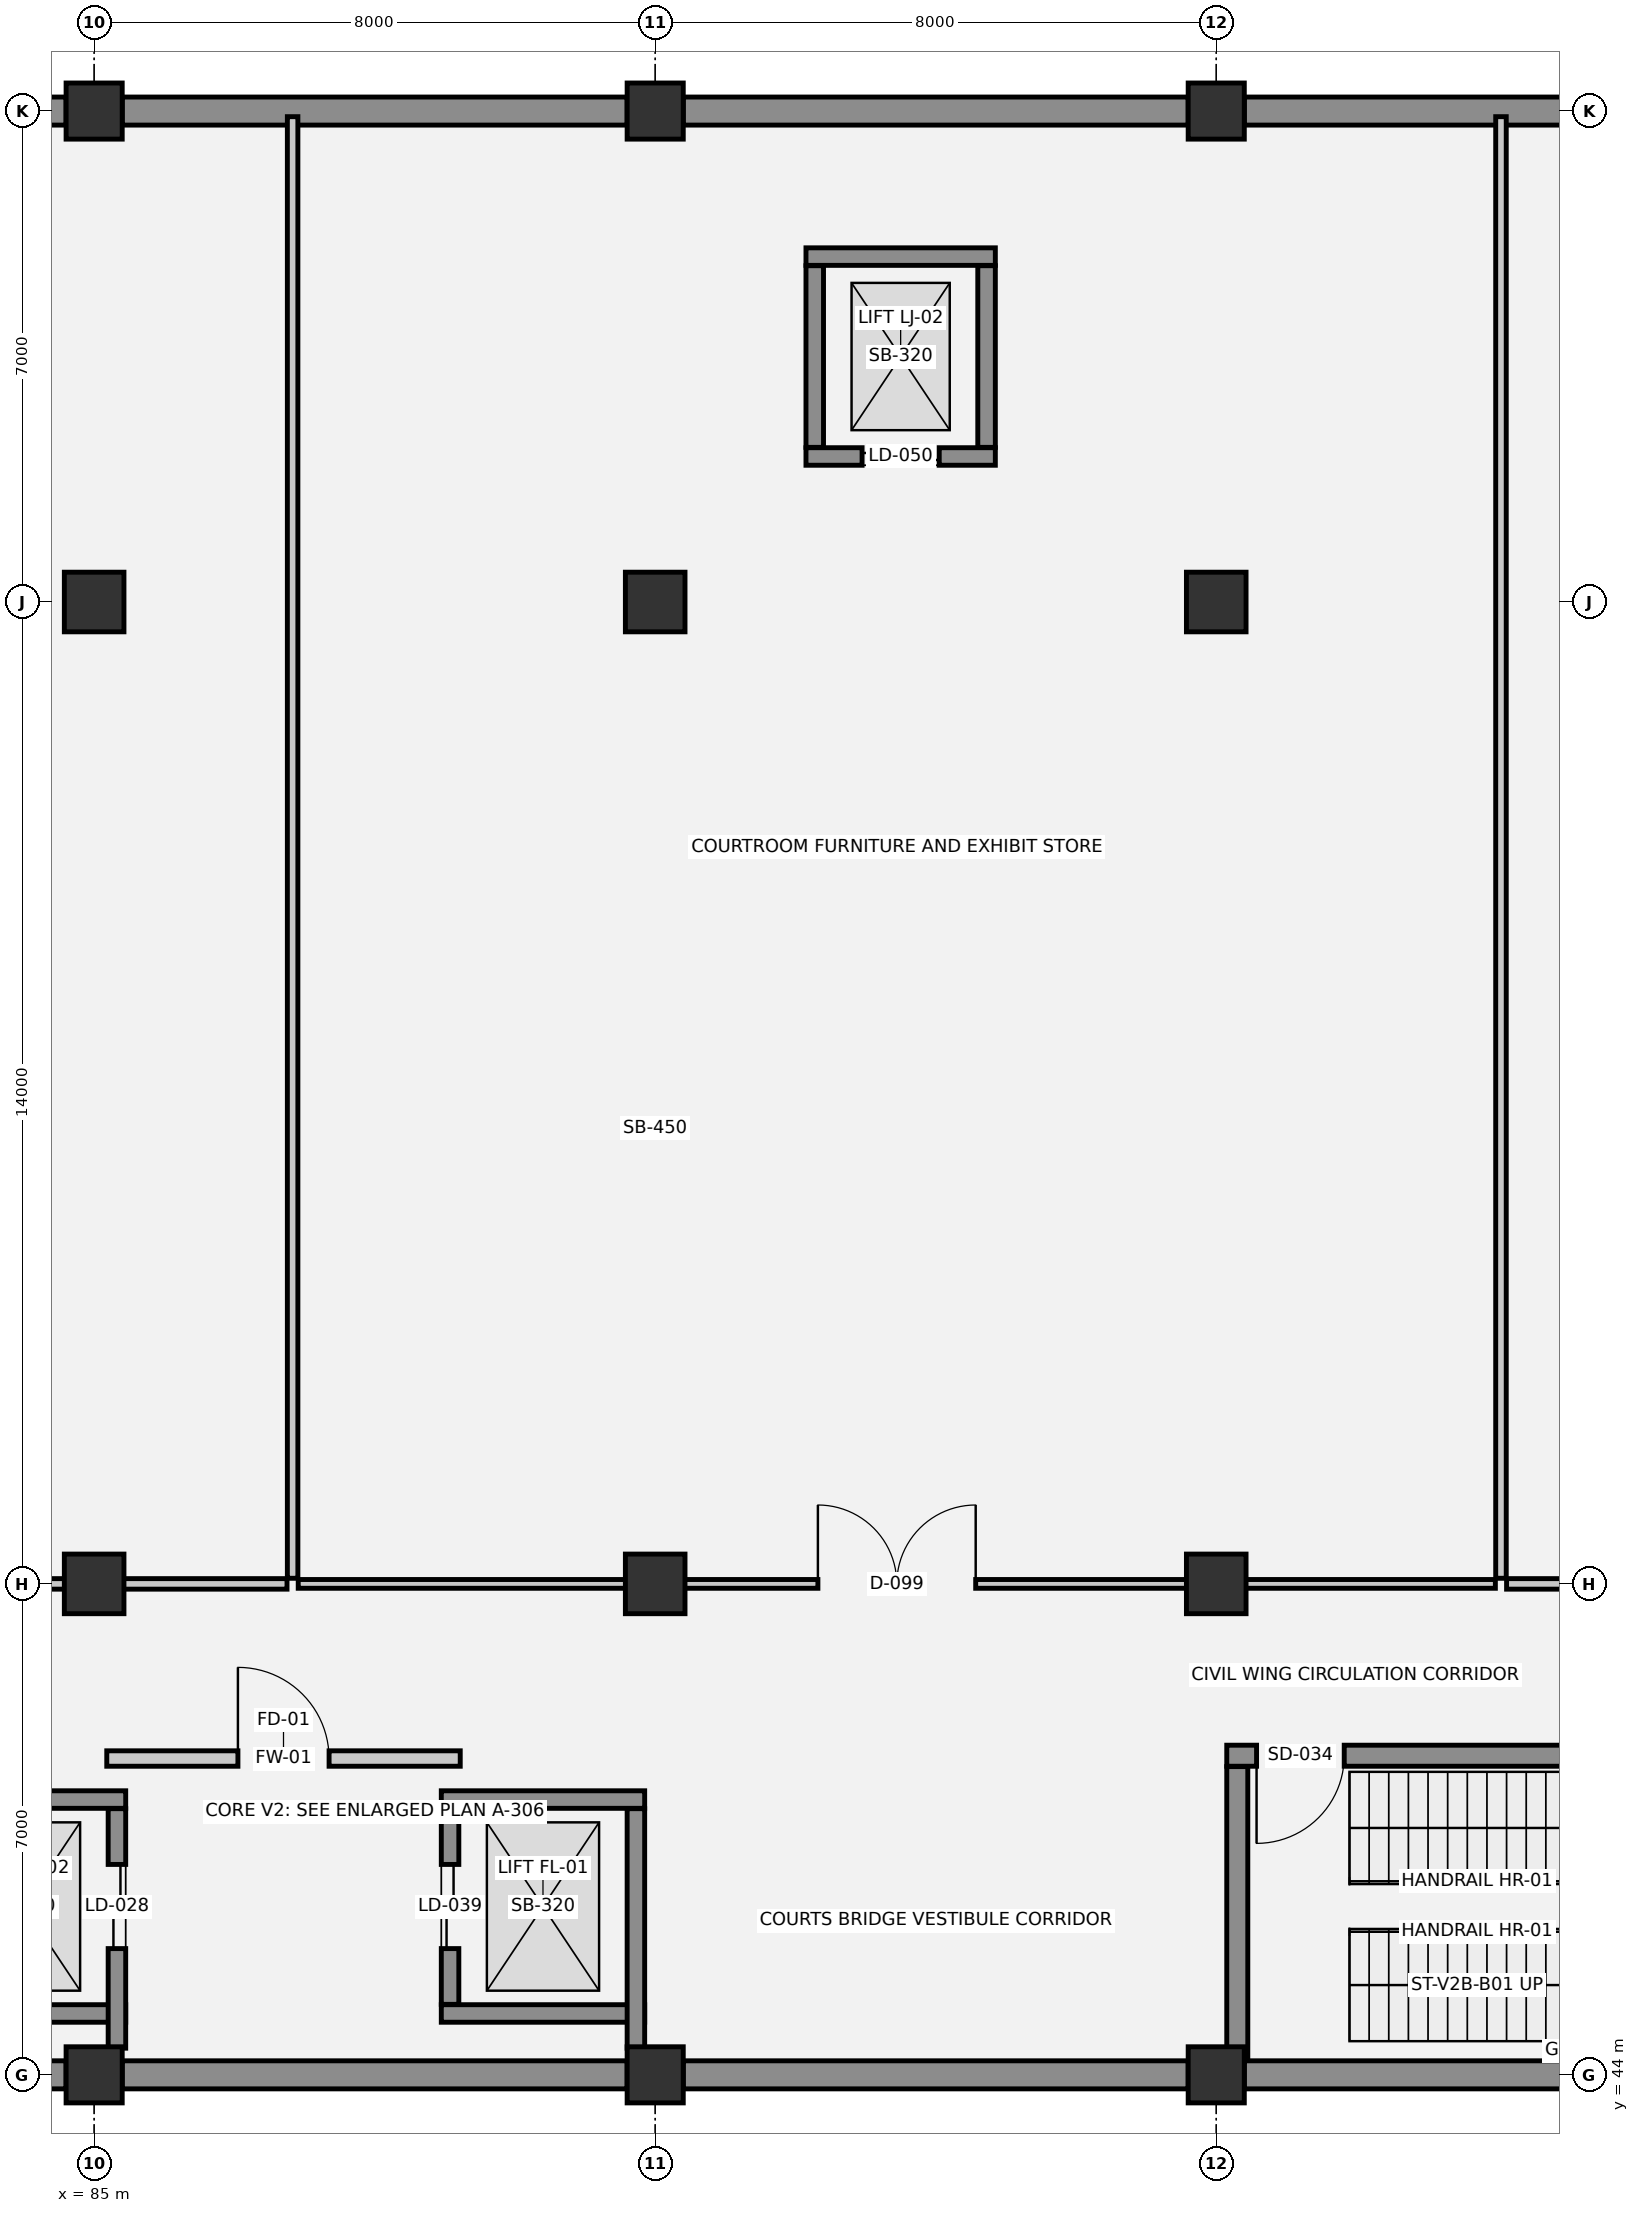
"""IFC4 building model, lengths in metres.
Left out: names, types, materials, properties, quantities, classifications, styles, units other than length and angle.
Written with IfcOpenShell. Run it as: python <this file> out.ifc"""

import sys

from ifc_helpers import new_model, si_unit, direction, frame, frame_2d, origin, origin_2d, place, context, subcontext, project, spatial, rectangle, extrude, element, fill, save


model = new_model("IFC4")
c1 = context("Model", 3, precision=1e-05, world=origin(), true_north=direction((0.0, 1.0)))
c2 = subcontext(c1, "Body", "Model", "MODEL_VIEW")
j1 = project(units=[si_unit("LENGTHUNIT", "METRE"), si_unit("PLANEANGLEUNIT", "RADIAN")], contexts=[c1])
p1 = place(None, origin())
s1 = spatial("IfcSite", under=j1, at=p1, CompositionType="ELEMENT")
p2 = place(p1, origin())
s2 = spatial("IfcBuilding", under=s1, at=p2, CompositionType="ELEMENT")
p3 = place(p2, frame((0.0, 0.0, -4.5)))
s3 = spatial("IfcBuildingStorey", under=s2, at=p3, CompositionType="ELEMENT", Elevation=-4.5)
p4 = place(p3, frame((85.0, 44.0, 0.0), z_axis=(0.0, 0.0, 1.0), x_axis=(1.0, 0.0, 0.0)))
e1 = element("IfcColumn", 1, at=p4, inside=s3, PredefinedType="COLUMN", context=c2, shape_type="SweptSolid", body=[
    extrude(rectangle(XDim=0.8, YDim=0.8, at=origin_2d()), origin(), (0.0, 0.0, 1.0), 4.5),
])
for number, where, z_axis, x_axis in (
    (2, (85.0, 51.0, 0.0), (0.0, 0.0, 1.0), (1.0, 0.0, 0.0)),
    (3, (85.0, 65.0, 0.0), (0.0, 0.0, 1.0), (1.0, 0.0, 0.0)),
):
    element("IfcColumn", number, at=place(p3, frame(where, z_axis=z_axis, x_axis=x_axis)), inside=s3, PredefinedType="COLUMN", context=c2, shape_type="SweptSolid", body=[
        extrude(rectangle(XDim=0.85, YDim=0.85, at=origin_2d()), origin(), (0.0, 0.0, 1.0), 4.5),
    ])
for number, where, z_axis, x_axis in (
    (4, (85.0, 72.0, 0.0), (0.0, 0.0, 1.0), (1.0, 0.0, 0.0)),
    (5, (93.0, 44.0, 0.0), (0.0, 0.0, 1.0), (1.0, 0.0, 0.0)),
):
    element("IfcColumn", number, at=place(p3, frame(where, z_axis=z_axis, x_axis=x_axis)), inside=s3, PredefinedType="COLUMN", context=c2, shape_type="SweptSolid", body=[
        extrude(rectangle(XDim=0.8, YDim=0.8, at=origin_2d()), origin(), (0.0, 0.0, 1.0), 4.5),
    ])
for number, where, z_axis, x_axis in (
    (6, (93.0, 51.0, 0.0), (0.0, 0.0, 1.0), (1.0, 0.0, 0.0)),
    (7, (93.0, 65.0, 0.0), (0.0, 0.0, 1.0), (1.0, 0.0, 0.0)),
):
    element("IfcColumn", number, at=place(p3, frame(where, z_axis=z_axis, x_axis=x_axis)), inside=s3, PredefinedType="COLUMN", context=c2, shape_type="SweptSolid", body=[
        extrude(rectangle(XDim=0.85, YDim=0.85, at=origin_2d()), origin(), (0.0, 0.0, 1.0), 4.5),
    ])
for number, where, z_axis, x_axis in (
    (8, (93.0, 72.0, 0.0), (0.0, 0.0, 1.0), (1.0, 0.0, 0.0)),
    (9, (101.0, 44.0, 0.0), (0.0, 0.0, 1.0), (1.0, 0.0, 0.0)),
):
    element("IfcColumn", number, at=place(p3, frame(where, z_axis=z_axis, x_axis=x_axis)), inside=s3, PredefinedType="COLUMN", context=c2, shape_type="SweptSolid", body=[
        extrude(rectangle(XDim=0.8, YDim=0.8, at=origin_2d()), origin(), (0.0, 0.0, 1.0), 4.5),
    ])
for number, where, z_axis, x_axis in (
    (10, (101.0, 51.0, 0.0), (0.0, 0.0, 1.0), (1.0, 0.0, 0.0)),
    (11, (101.0, 65.0, 0.0), (0.0, 0.0, 1.0), (1.0, 0.0, 0.0)),
):
    element("IfcColumn", number, at=place(p3, frame(where, z_axis=z_axis, x_axis=x_axis)), inside=s3, PredefinedType="COLUMN", context=c2, shape_type="SweptSolid", body=[
        extrude(rectangle(XDim=0.85, YDim=0.85, at=origin_2d()), origin(), (0.0, 0.0, 1.0), 4.5),
    ])
p5 = place(p3, frame((101.0, 72.0, 0.0), z_axis=(0.0, 0.0, 1.0), x_axis=(1.0, 0.0, 0.0)))
e12 = element("IfcColumn", 12, at=p5, inside=s3, PredefinedType="COLUMN", context=c2, shape_type="SweptSolid", body=[
    extrude(rectangle(XDim=0.8, YDim=0.8, at=origin_2d()), origin(), (0.0, 0.0, 1.0), 4.5),
])
for number, where, z_axis, x_axis in (
    (13, (77.4, 72.0, 0.0), (0.0, 0.0, 1.0), (1.0, 0.0, 0.0)),
    (14, (85.4, 72.0, 0.0), (0.0, 0.0, 1.0), (1.0, 0.0, 0.0)),
    (15, (93.4, 72.0, 0.0), (0.0, 0.0, 1.0), (1.0, 0.0, 0.0)),
    (16, (101.4, 72.0, 0.0), (0.0, 0.0, 1.0), (1.0, 0.0, 0.0)),
    (17, (108.6, 44.0, 0.0), (0.0, 0.0, 1.0), (-1.0, 0.0, 0.0)),
    (18, (100.6, 44.0, 0.0), (0.0, 0.0, 1.0), (-1.0, 0.0, 0.0)),
    (19, (92.6, 44.0, 0.0), (0.0, 0.0, 1.0), (-1.0, 0.0, 0.0)),
    (20, (84.6, 44.0, 0.0), (0.0, 0.0, 1.0), (-1.0, 0.0, 0.0)),
):
    element("IfcWall", number, at=place(p3, frame(where, z_axis=z_axis, x_axis=x_axis)), inside=s3, PredefinedType="STANDARD", context=c2, shape_type="SweptSolid", body=[
        extrude(rectangle(XDim=7.2, YDim=0.4, at=frame_2d((3.6, 0.0))), origin(), (0.0, 0.0, 1.0), 4.2),
    ])
for number, where, z_axis, x_axis in (
    (21, (82.55, 44.875, 0.0), (0.0, 0.0, 1.0), (1.0, 0.0, 0.0)),
    (22, (85.45, 47.925, 0.0), (0.0, 0.0, 1.0), (-1.0, 0.0, 0.0)),
):
    element("IfcWall", number, at=place(p3, frame(where, z_axis=z_axis, x_axis=x_axis)), inside=s3, PredefinedType="SHEAR", context=c2, shape_type="SweptSolid", body=[
        extrude(rectangle(XDim=2.9, YDim=0.25, at=frame_2d((1.45, 0.0))), origin(), (0.0, 0.0, 1.0), 4.5),
    ])
p6 = place(p3, frame((85.325, 44.38, 0.0), z_axis=(0.0, 0.0, 1.0), x_axis=(0.0, 1.0, 0.0)))
e23 = element("IfcWall", 23, at=p6, inside=s3, PredefinedType="SHEAR", context=c2, shape_type="SweptSolid", body=[
    extrude(rectangle(XDim=3.415, YDim=0.25, at=frame_2d((1.708, 0.0))), origin(), (0.0, 0.0, 1.0), 4.5),
])
p7 = place(p6, frame((1.42, 0.0, 0.0)))
e24 = element("IfcOpeningElement", 24, at=p7, cuts=e23, PredefinedType="OPENING", context=c2, shape_type="SweptSolid", body=[
    extrude(rectangle(XDim=1.2, YDim=2.2, at=frame_2d((0.6, 1.1))), frame((0.0, 0.135, 0.0), z_axis=(0.0, -1.0, 0.0), x_axis=(1.0, 0.0, 0.0)), (0.0, 0.0, 1.0), 0.27),
])
for number, where, z_axis, x_axis in (
    (25, (89.95, 44.875, 0.0), (0.0, 0.0, 1.0), (1.0, 0.0, 0.0)),
    (26, (92.85, 47.925, 0.0), (0.0, 0.0, 1.0), (-1.0, 0.0, 0.0)),
):
    element("IfcWall", number, at=place(p3, frame(where, z_axis=z_axis, x_axis=x_axis)), inside=s3, PredefinedType="SHEAR", context=c2, shape_type="SweptSolid", body=[
        extrude(rectangle(XDim=2.9, YDim=0.25, at=frame_2d((1.45, 0.0))), origin(), (0.0, 0.0, 1.0), 4.5),
    ])
p8 = place(p3, frame((90.075, 47.795, 0.0), z_axis=(0.0, 0.0, 1.0), x_axis=(0.0, -1.0, 0.0)))
e27 = element("IfcWall", 27, at=p8, inside=s3, PredefinedType="SHEAR", context=c2, shape_type="SweptSolid", body=[
    extrude(rectangle(XDim=2.79, YDim=0.25, at=frame_2d((1.395, 0.0))), origin(), (0.0, 0.0, 1.0), 4.5),
])
p9 = place(p8, frame((0.795, 0.0, 0.0)))
e28 = element("IfcOpeningElement", 28, at=p9, cuts=e27, PredefinedType="OPENING", context=c2, shape_type="SweptSolid", body=[
    extrude(rectangle(XDim=1.2, YDim=2.2, at=frame_2d((0.6, 1.1))), frame((0.0, 0.135, 0.0), z_axis=(0.0, -1.0, 0.0), x_axis=(1.0, 0.0, 0.0)), (0.0, 0.0, 1.0), 0.27),
])
p10 = place(p3, frame((92.725, 44.38, 0.0), z_axis=(0.0, 0.0, 1.0), x_axis=(0.0, 1.0, 0.0)))
e29 = element("IfcWall", 29, at=p10, inside=s3, PredefinedType="SHEAR", context=c2, shape_type="SweptSolid", body=[
    extrude(rectangle(XDim=3.415, YDim=0.25, at=frame_2d((1.708, 0.0))), origin(), (0.0, 0.0, 1.0), 4.5),
])
p11 = place(p3, frame((95.15, 67.075, 0.0), z_axis=(0.0, 0.0, 1.0), x_axis=(1.0, 0.0, 0.0)))
e30 = element("IfcWall", 30, at=p11, inside=s3, PredefinedType="SHEAR", context=c2, shape_type="SweptSolid", body=[
    extrude(rectangle(XDim=2.7, YDim=0.25, at=frame_2d((1.35, 0.0))), origin(), (0.0, 0.0, 1.0), 4.5),
])
p12 = place(p11, frame((0.8, 0.0, 0.0)))
e31 = element("IfcOpeningElement", 31, at=p12, cuts=e30, PredefinedType="OPENING", context=c2, shape_type="SweptSolid", body=[
    extrude(rectangle(XDim=1.1, YDim=2.15, at=frame_2d((0.55, 1.075))), frame((0.0, 0.135, 0.0), z_axis=(0.0, -1.0, 0.0), x_axis=(1.0, 0.0, 0.0)), (0.0, 0.0, 1.0), 0.27),
])
p13 = place(p3, frame((97.85, 69.925, 0.0), z_axis=(0.0, 0.0, 1.0), x_axis=(-1.0, 0.0, 0.0)))
e32 = element("IfcWall", 32, at=p13, inside=s3, PredefinedType="SHEAR", context=c2, shape_type="SweptSolid", body=[
    extrude(rectangle(XDim=2.7, YDim=0.25, at=frame_2d((1.35, 0.0))), origin(), (0.0, 0.0, 1.0), 4.5),
])
for number, where, z_axis, x_axis in (
    (33, (95.275, 69.795, 0.0), (0.0, 0.0, 1.0), (0.0, -1.0, 0.0)),
    (34, (97.725, 67.205, 0.0), (0.0, 0.0, 1.0), (0.0, 1.0, 0.0)),
):
    element("IfcWall", number, at=place(p3, frame(where, z_axis=z_axis, x_axis=x_axis)), inside=s3, PredefinedType="SHEAR", context=c2, shape_type="SweptSolid", body=[
        extrude(rectangle(XDim=2.59, YDim=0.25, at=frame_2d((1.295, 0.0))), origin(), (0.0, 0.0, 1.0), 4.5),
    ])
p14 = place(p3, frame((108.85, 48.55, 0.0), z_axis=(0.0, 0.0, 1.0), x_axis=(-1.0, 0.0, 0.0)))
e35 = element("IfcWall", 35, at=p14, inside=s3, PredefinedType="SHEAR", context=c2, shape_type="SweptSolid", body=[
    extrude(rectangle(XDim=7.7, YDim=0.3, at=frame_2d((3.85, 0.0))), origin(), (0.0, 0.0, 1.0), 4.2),
])
p15 = place(p14, frame((6.025, 0.0, 0.0)))
e36 = element("IfcOpeningElement", 36, at=p15, cuts=e35, PredefinedType="OPENING", context=c2, shape_type="SweptSolid", body=[
    extrude(rectangle(XDim=1.25, YDim=2.15, at=frame_2d((0.625, 1.075))), frame((0.0, 0.16, 0.0), z_axis=(0.0, -1.0, 0.0), x_axis=(1.0, 0.0, 0.0)), (0.0, 0.0, 1.0), 0.32),
])
p16 = place(p3, frame((101.3, 48.395, 0.0), z_axis=(0.0, 0.0, 1.0), x_axis=(0.0, -1.0, 0.0)))
e37 = element("IfcWall", 37, at=p16, inside=s3, PredefinedType="SHEAR", context=c2, shape_type="SweptSolid", body=[
    extrude(rectangle(XDim=4.19, YDim=0.3, at=frame_2d((2.095, 0.0))), origin(), (0.0, 0.0, 1.0), 4.2),
])
p17 = place(p3, frame((85.18, 48.51, 0.0), z_axis=(0.0, 0.0, 1.0), x_axis=(1.0, 0.0, 0.0)))
e38 = element("IfcWall", 38, at=p17, inside=s3, PredefinedType="SOLIDWALL", context=c2, shape_type="SweptSolid", body=[
    extrude(rectangle(XDim=5.04, YDim=0.22, at=frame_2d((2.52, 0.0))), origin(), (0.0, 0.0, 1.0), 4.2),
])
p18 = place(p17, frame((1.87, 0.0, 0.0)))
e39 = element("IfcOpeningElement", 39, at=p18, cuts=e38, PredefinedType="OPENING", context=c2, shape_type="SweptSolid", body=[
    extrude(rectangle(XDim=1.3, YDim=2.15, at=frame_2d((0.65, 1.075))), frame((0.0, 0.12, 0.0), z_axis=(0.0, -1.0, 0.0), x_axis=(1.0, 0.0, 0.0)), (0.0, 0.0, 1.0), 0.24),
])
p19 = place(p3, frame((82.4, 51.0, 0.0), z_axis=(0.0, 0.0, 1.0), x_axis=(1.0, 0.0, 0.0)))
e40 = element("IfcWall", 40, at=p19, inside=s3, PredefinedType="PARTITIONING", context=c2, shape_type="SweptSolid", body=[
    extrude(rectangle(XDim=5.35, YDim=0.15, at=frame_2d((2.675, 0.0))), origin(), (0.0, 0.0, 1.0), 3.4),
])
p20 = place(p3, frame((87.91, 51.0, 0.0), z_axis=(0.0, 0.0, 1.0), x_axis=(1.0, 0.0, 0.0)))
e41 = element("IfcWall", 41, at=p20, inside=s3, PredefinedType="PARTITIONING", context=c2, shape_type="SweptSolid", body=[
    extrude(rectangle(XDim=17.07, YDim=0.125, at=frame_2d((8.535, 0.0))), origin(), (0.0, 0.0, 1.0), 3.4),
])
p21 = place(p20, frame((7.41, 0.0, 0.0)))
e42 = element("IfcOpeningElement", 42, at=p21, cuts=e41, PredefinedType="OPENING", context=c2, shape_type="SweptSolid", body=[
    extrude(rectangle(XDim=2.25, YDim=2.4, at=frame_2d((1.125, 1.2))), frame((0.0, 0.073, 0.0), z_axis=(0.0, -1.0, 0.0), x_axis=(1.0, 0.0, 0.0)), (0.0, 0.0, 1.0), 0.145),
])
p22 = place(p3, frame((105.14, 51.0, 0.0), z_axis=(0.0, 0.0, 1.0), x_axis=(1.0, 0.0, 0.0)))
e43 = element("IfcWall", 43, at=p22, inside=s3, PredefinedType="PARTITIONING", context=c2, shape_type="SweptSolid", body=[
    extrude(rectangle(XDim=18.78, YDim=0.15, at=frame_2d((9.39, 0.0))), origin(), (0.0, 0.0, 1.0), 3.4),
])
p23 = place(p22, frame((8.24, 0.0, 0.0)))
e44 = element("IfcOpeningElement", 44, at=p23, cuts=e43, PredefinedType="OPENING", context=c2, shape_type="SweptSolid", body=[
    extrude(rectangle(XDim=2.3, YDim=2.4, at=frame_2d((1.15, 1.2))), frame((0.0, 0.085, 0.0), z_axis=(0.0, -1.0, 0.0), x_axis=(1.0, 0.0, 0.0)), (0.0, 0.0, 1.0), 0.17),
])
for number, where, z_axis, x_axis in (
    (45, (87.83, 51.08, 0.0), (0.0, 0.0, 1.0), (0.0, 1.0, 0.0)),
    (46, (105.06, 51.08, 0.0), (0.0, 0.0, 1.0), (0.0, 1.0, 0.0)),
):
    element("IfcWall", number, at=place(p3, frame(where, z_axis=z_axis, x_axis=x_axis)), inside=s3, PredefinedType="PARTITIONING", context=c2, shape_type="SweptSolid", body=[
        extrude(rectangle(XDim=20.84, YDim=0.15, at=frame_2d((10.42, 0.0))), origin(), (0.0, 0.0, 1.0), 4.14),
    ])
p24 = place(p7, origin())
e47 = element("IfcDoor", 47, at=p24, inside=s3, OperationType="DOUBLE_DOOR_SLIDING", PredefinedType="DOOR", context=c2, shape_type="SweptSolid", body=[
    extrude(rectangle(XDim=1.2, YDim=2.2, at=frame_2d((0.6, 1.1))), frame((0.0, 0.025, 0.0), z_axis=(0.0, -1.0, 0.0), x_axis=(1.0, 0.0, 0.0)), (0.0, 0.0, 1.0), 0.05),
])
fill(e24, e47)
p25 = place(p9, origin())
e48 = element("IfcDoor", 48, at=p25, inside=s3, OperationType="DOUBLE_DOOR_SLIDING", PredefinedType="DOOR", context=c2, shape_type="SweptSolid", body=[
    extrude(rectangle(XDim=1.2, YDim=2.2, at=frame_2d((0.6, 1.1))), frame((0.0, 0.025, 0.0), z_axis=(0.0, -1.0, 0.0), x_axis=(1.0, 0.0, 0.0)), (0.0, 0.0, 1.0), 0.05),
])
fill(e28, e48)
p26 = place(p12, origin())
e49 = element("IfcDoor", 49, at=p26, inside=s3, OperationType="DOUBLE_DOOR_SLIDING", PredefinedType="DOOR", context=c2, shape_type="SweptSolid", body=[
    extrude(rectangle(XDim=1.1, YDim=2.15, at=frame_2d((0.55, 1.075))), frame((0.0, 0.025, 0.0), z_axis=(0.0, -1.0, 0.0), x_axis=(1.0, 0.0, 0.0)), (0.0, 0.0, 1.0), 0.05),
])
fill(e31, e49)
p27 = place(p15, origin())
e50 = element("IfcDoor", 50, at=p27, inside=s3, OperationType="SINGLE_SWING_RIGHT", PredefinedType="DOOR", context=c2, shape_type="SweptSolid", body=[
    extrude(rectangle(XDim=1.25, YDim=2.15, at=frame_2d((0.625, 1.075))), frame((0.0, 0.025, 0.0), z_axis=(0.0, -1.0, 0.0), x_axis=(1.0, 0.0, 0.0)), (0.0, 0.0, 1.0), 0.05),
])
fill(e36, e50)
p28 = place(p18, origin())
e51 = element("IfcDoor", 51, at=p28, inside=s3, OperationType="SINGLE_SWING_LEFT", PredefinedType="DOOR", context=c2, shape_type="SweptSolid", body=[
    extrude(rectangle(XDim=1.3, YDim=2.15, at=frame_2d((0.65, 1.075))), frame((0.0, 0.025, 0.0), z_axis=(0.0, -1.0, 0.0), x_axis=(1.0, 0.0, 0.0)), (0.0, 0.0, 1.0), 0.05),
])
fill(e39, e51)
p29 = place(p21, origin())
e52 = element("IfcDoor", 52, at=p29, inside=s3, OperationType="DOUBLE_DOOR_SINGLE_SWING", PredefinedType="DOOR", context=c2, shape_type="SweptSolid", body=[
    extrude(rectangle(XDim=2.25, YDim=2.4, at=frame_2d((1.125, 1.2))), frame((0.0, 0.025, 0.0), z_axis=(0.0, -1.0, 0.0), x_axis=(1.0, 0.0, 0.0)), (0.0, 0.0, 1.0), 0.05),
])
fill(e42, e52)
save(model, sys.argv[1])
